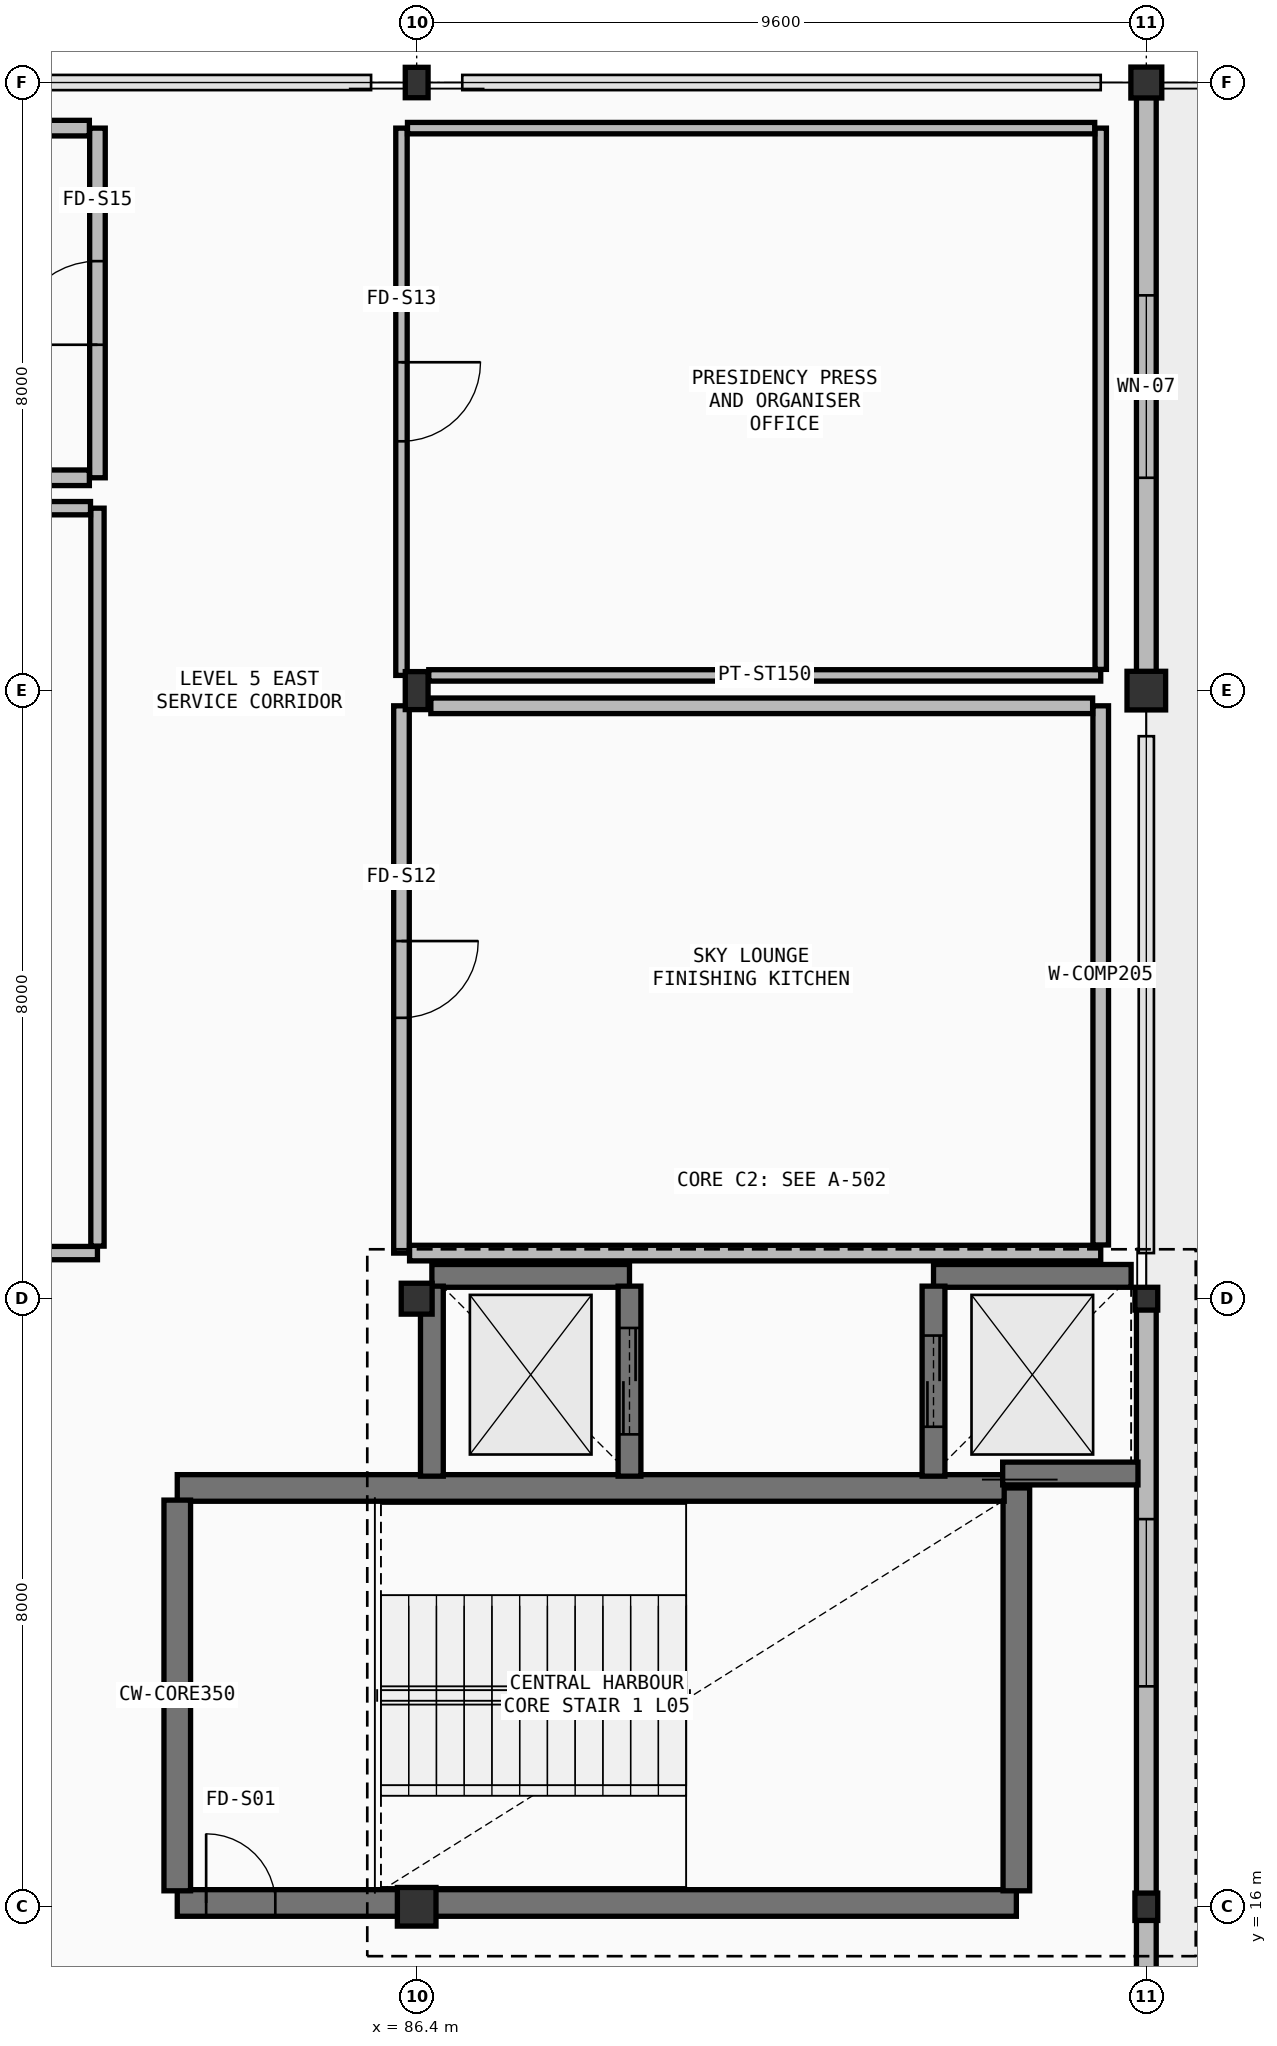
"""IFC4 building model, lengths in metres.
Left out: names, types, materials, properties, quantities, classifications, styles, units other than length and angle.
Written with IfcOpenShell. Run it as: python <this file> out.ifc"""

import sys

from ifc_helpers import new_model, si_unit, direction, frame, frame_2d, origin, origin_2d, place, context, subcontext, project, spatial, rectangle, hollow_circle, i_section, extrude, element, fill, save


model = new_model("IFC4")
c1 = context("Model", 3, precision=1e-05, world=origin(), true_north=direction((0.0, 1.0)))
c2 = subcontext(c1, "Body", "Model", "MODEL_VIEW")
j1 = project(units=[si_unit("LENGTHUNIT", "METRE"), si_unit("PLANEANGLEUNIT", "RADIAN")], contexts=[c1])
p1 = place(None, origin())
s1 = spatial("IfcSite", under=j1, at=p1, CompositionType="ELEMENT")
p2 = place(p1, origin())
s2 = spatial("IfcBuilding", under=s1, at=p2, CompositionType="ELEMENT")
p3 = place(p2, frame((0.0, 0.0, 24.9)))
s3 = spatial("IfcBuildingStorey", under=s2, at=p3, CompositionType="ELEMENT", Elevation=24.9)
p4 = place(p3, frame((86.4, 16.0, 0.0), z_axis=(0.0, 0.0, 1.0), x_axis=(1.0, 0.0, 0.0)))
e1 = element("IfcColumn", 1, at=p4, inside=s3, PredefinedType="COLUMN", context=c2, shape_type="SweptSolid", body=[
    extrude(hollow_circle(Radius=0.254, WallThickness=0.025, at=origin_2d()), origin(), (0.0, 0.0, 1.0), 4.5),
])
p5 = place(p3, frame((86.4, 24.0, 0.0), z_axis=(0.0, 0.0, 1.0), x_axis=(1.0, 0.0, 0.0)))
e2 = element("IfcColumn", 2, at=p5, inside=s3, PredefinedType="COLUMN", context=c2, shape_type="SweptSolid", body=[
    extrude(hollow_circle(Radius=0.203, WallThickness=0.02, at=origin_2d()), origin(), (0.0, 0.0, 1.0), 4.5),
])
p6 = place(p3, frame((86.4, 32.0, 0.0), z_axis=(0.0, 0.0, 1.0), x_axis=(1.0, 0.0, 0.0)))
e3 = element("IfcColumn", 3, at=p6, inside=s3, PredefinedType="COLUMN", context=c2, shape_type="SweptSolid", body=[
    extrude(i_section(OverallWidth=0.3, OverallDepth=0.5, WebThickness=0.014, FlangeThickness=0.028, FilletRadius=0.027, at=origin_2d()), origin(), (0.0, 0.0, 1.0), 4.5),
])
p7 = place(p3, frame((86.4, 40.0, 0.0), z_axis=(0.0, 0.0, 1.0), x_axis=(1.0, 0.0, 0.0)))
e4 = element("IfcColumn", 4, at=p7, inside=s3, PredefinedType="COLUMN", context=c2, shape_type="SweptSolid", body=[
    extrude(i_section(OverallWidth=0.3, OverallDepth=0.4, WebThickness=0.013, FlangeThickness=0.024, FilletRadius=0.027, at=origin_2d()), origin(), (0.0, 0.0, 1.0), 4.5),
])
p8 = place(p3, frame((96.0, 16.0, 0.0), z_axis=(0.0, 0.0, 1.0), x_axis=(1.0, 0.0, 0.0)))
e5 = element("IfcColumn", 5, at=p8, inside=s3, PredefinedType="COLUMN", context=c2, shape_type="SweptSolid", body=[
    extrude(i_section(OverallWidth=0.3, OverallDepth=0.36, WebThickness=0.012, FlangeThickness=0.022, FilletRadius=0.027, at=origin_2d()), origin(), (0.0, 0.0, 1.0), 4.5),
])
p9 = place(p3, frame((96.0, 24.0, 0.0), z_axis=(0.0, 0.0, 1.0), x_axis=(1.0, 0.0, 0.0)))
e6 = element("IfcColumn", 6, at=p9, inside=s3, PredefinedType="COLUMN", context=c2, shape_type="SweptSolid", body=[
    extrude(i_section(OverallWidth=0.3, OverallDepth=0.3, WebThickness=0.011, FlangeThickness=0.019, FilletRadius=0.027, at=origin_2d()), origin(), (0.0, 0.0, 1.0), 4.5),
])
p10 = place(p3, frame((96.0, 32.0, 0.0), z_axis=(0.0, 0.0, 1.0), x_axis=(1.0, 0.0, 0.0)))
e7 = element("IfcColumn", 7, at=p10, inside=s3, PredefinedType="COLUMN", context=c2, shape_type="SweptSolid", body=[
    extrude(hollow_circle(Radius=0.254, WallThickness=0.025, at=origin_2d()), origin(), (0.0, 0.0, 1.0), 4.5),
])
p11 = place(p3, frame((96.0, 40.0, 0.0), z_axis=(0.0, 0.0, 1.0), x_axis=(1.0, 0.0, 0.0)))
e8 = element("IfcColumn", 8, at=p11, inside=s3, PredefinedType="COLUMN", context=c2, shape_type="SweptSolid", body=[
    extrude(hollow_circle(Radius=0.203, WallThickness=0.02, at=origin_2d()), origin(), (0.0, 0.0, 1.0), 4.5),
])
p12 = place(p3, frame((96.0, 10.8, 0.0), z_axis=(0.0, 0.0, 1.0), x_axis=(0.0, 1.0, 0.0)))
e9 = element("IfcWall", 9, at=p12, inside=s3, PredefinedType="STANDARD", context=c2, shape_type="SweptSolid", body=[
    extrude(rectangle(XDim=5.2, YDim=0.26, at=frame_2d((2.6, 0.0))), origin(), (0.0, 0.0, 1.0), 4.26),
])
p13 = place(p12, frame((1.6, 0.0, 0.9)))
e10 = element("IfcOpeningElement", 10, at=p13, cuts=e9, PredefinedType="OPENING", context=c2, shape_type="SweptSolid", body=[
    extrude(rectangle(XDim=2.0, YDim=2.1, at=frame_2d((1.0, 1.05))), frame((0.0, 0.14, 0.0), z_axis=(0.0, -1.0, 0.0), x_axis=(1.0, 0.0, 0.0)), (0.0, 0.0, 1.0), 0.28),
])
p14 = place(p3, frame((96.0, 16.0, 0.0), z_axis=(0.0, 0.0, 1.0), x_axis=(0.0, 1.0, 0.0)))
e11 = element("IfcWall", 11, at=p14, inside=s3, PredefinedType="STANDARD", context=c2, shape_type="SweptSolid", body=[
    extrude(rectangle(XDim=8.0, YDim=0.26, at=frame_2d((4.0, 0.0))), origin(), (0.0, 0.0, 1.0), 3.84),
])
p15 = place(p14, frame((2.9, 0.0, 0.9)))
e12 = element("IfcOpeningElement", 12, at=p15, cuts=e11, PredefinedType="OPENING", context=c2, shape_type="SweptSolid", body=[
    extrude(rectangle(XDim=2.2, YDim=2.15, at=frame_2d((1.1, 1.075))), frame((0.0, 0.14, 0.0), z_axis=(0.0, -1.0, 0.0), x_axis=(1.0, 0.0, 0.0)), (0.0, 0.0, 1.0), 0.28),
])
p16 = place(p3, frame((96.0, 32.0, 0.0), z_axis=(0.0, 0.0, 1.0), x_axis=(0.0, 1.0, 0.0)))
e13 = element("IfcWall", 13, at=p16, inside=s3, PredefinedType="STANDARD", context=c2, shape_type="SweptSolid", body=[
    extrude(rectangle(XDim=8.0, YDim=0.26, at=frame_2d((4.0, 0.0))), origin(), (0.0, 0.0, 1.0), 3.83),
])
p17 = place(p16, frame((2.8, 0.0, 0.9)))
e14 = element("IfcOpeningElement", 14, at=p17, cuts=e13, PredefinedType="OPENING", context=c2, shape_type="SweptSolid", body=[
    extrude(rectangle(XDim=2.4, YDim=2.2, at=frame_2d((1.2, 1.1))), frame((0.0, 0.14, 0.0), z_axis=(0.0, -1.0, 0.0), x_axis=(1.0, 0.0, 0.0)), (0.0, 0.0, 1.0), 0.28),
])
p18 = place(p3, frame((83.25, 16.05, 0.0), z_axis=(0.0, 0.0, 1.0), x_axis=(1.0, 0.0, 0.0)))
e15 = element("IfcWall", 15, at=p18, inside=s3, PredefinedType="SHEAR", context=c2, shape_type="SweptSolid", body=[
    extrude(rectangle(XDim=11.04, YDim=0.35, at=frame_2d((5.52, 0.0))), origin(), (0.0, 0.0, 1.0), 4.27),
])
p19 = place(p18, frame((0.38, 0.0, 0.0)))
e16 = element("IfcOpeningElement", 16, at=p19, cuts=e15, PredefinedType="OPENING", context=c2, shape_type="SweptSolid", body=[
    extrude(rectangle(XDim=0.91, YDim=2.08, at=frame_2d((0.455, 1.04))), frame((0.0, 0.185, 0.0), z_axis=(0.0, -1.0, 0.0), x_axis=(1.0, 0.0, 0.0)), (0.0, 0.0, 1.0), 0.37),
])
p20 = place(p3, frame((94.29, 16.21, 0.0), z_axis=(0.0, 0.0, 1.0), x_axis=(0.0, 1.0, 0.0)))
e17 = element("IfcWall", 17, at=p20, inside=s3, PredefinedType="SHEAR", context=c2, shape_type="SweptSolid", body=[
    extrude(rectangle(XDim=5.3, YDim=0.35, at=frame_2d((2.65, 0.0))), origin(), (0.0, 0.0, 1.0), 4.27),
])
p21 = place(p3, frame((94.13, 21.51, 0.0), z_axis=(0.0, 0.0, 1.0), x_axis=(-1.0, 0.0, 0.0)))
e18 = element("IfcWall", 18, at=p21, inside=s3, PredefinedType="SHEAR", context=c2, shape_type="SweptSolid", body=[
    extrude(rectangle(XDim=10.88, YDim=0.35, at=frame_2d((5.44, 0.0))), origin(), (0.0, 0.0, 1.0), 4.27),
])
p22 = place(p3, frame((83.25, 21.35, 0.0), z_axis=(0.0, 0.0, 1.0), x_axis=(0.0, -1.0, 0.0)))
e19 = element("IfcWall", 19, at=p22, inside=s3, PredefinedType="SHEAR", context=c2, shape_type="SweptSolid", body=[
    extrude(rectangle(XDim=5.14, YDim=0.35, at=frame_2d((2.57, 0.0))), origin(), (0.0, 0.0, 1.0), 4.27),
])
p23 = place(p3, frame((89.2, 24.3, 0.0), z_axis=(0.0, 0.0, 1.0), x_axis=(-1.0, 0.0, 0.0)))
e20 = element("IfcWall", 20, at=p23, inside=s3, PredefinedType="SHEAR", context=c2, shape_type="SweptSolid", body=[
    extrude(rectangle(XDim=2.6, YDim=0.3, at=frame_2d((1.3, 0.0))), origin(), (0.0, 0.0, 1.0), 4.27),
])
p24 = place(p3, frame((89.2, 21.665, 0.0), z_axis=(0.0, 0.0, 1.0), x_axis=(0.0, 1.0, 0.0)))
e21 = element("IfcWall", 21, at=p24, inside=s3, PredefinedType="SHEAR", context=c2, shape_type="SweptSolid", body=[
    extrude(rectangle(XDim=2.5, YDim=0.3, at=frame_2d((1.25, 0.0))), origin(), (0.0, 0.0, 1.0), 4.27),
])
p25 = place(p24, frame((0.55, 0.0, 0.0)))
e22 = element("IfcOpeningElement", 22, at=p25, cuts=e21, PredefinedType="OPENING", context=c2, shape_type="SweptSolid", body=[
    extrude(rectangle(XDim=1.4, YDim=2.26, at=frame_2d((0.7, 1.13))), frame((0.0, 0.16, 0.0), z_axis=(0.0, -1.0, 0.0), x_axis=(1.0, 0.0, 0.0)), (0.0, 0.0, 1.0), 0.32),
])
p26 = place(p3, frame((86.6, 24.165, 0.0), z_axis=(0.0, 0.0, 1.0), x_axis=(0.0, -1.0, 0.0)))
e23 = element("IfcWall", 23, at=p26, inside=s3, PredefinedType="SHEAR", context=c2, shape_type="SweptSolid", body=[
    extrude(rectangle(XDim=2.5, YDim=0.3, at=frame_2d((1.25, 0.0))), origin(), (0.0, 0.0, 1.0), 4.27),
])
p27 = place(p3, frame((95.8, 24.3, 0.0), z_axis=(0.0, 0.0, 1.0), x_axis=(-1.0, 0.0, 0.0)))
e24 = element("IfcWall", 24, at=p27, inside=s3, PredefinedType="SHEAR", context=c2, shape_type="SweptSolid", body=[
    extrude(rectangle(XDim=2.6, YDim=0.3, at=frame_2d((1.3, 0.0))), origin(), (0.0, 0.0, 1.0), 4.26),
])
p28 = place(p3, frame((94.11, 21.7, 0.0), z_axis=(0.0, 0.0, 1.0), x_axis=(1.0, 0.0, 0.0)))
e25 = element("IfcWall", 25, at=p28, inside=s3, PredefinedType="SHEAR", context=c2, shape_type="SweptSolid", body=[
    extrude(rectangle(XDim=1.78, YDim=0.3, at=frame_2d((0.89, 0.0))), origin(), (0.0, 0.0, 1.0), 4.27),
])
p29 = place(p3, frame((93.2, 24.165, 0.0), z_axis=(0.0, 0.0, 1.0), x_axis=(0.0, -1.0, 0.0)))
e26 = element("IfcWall", 26, at=p29, inside=s3, PredefinedType="SHEAR", context=c2, shape_type="SweptSolid", body=[
    extrude(rectangle(XDim=2.5, YDim=0.3, at=frame_2d((1.25, 0.0))), origin(), (0.0, 0.0, 1.0), 4.26),
])
p30 = place(p29, frame((0.65, 0.0, 0.0)))
e27 = element("IfcOpeningElement", 27, at=p30, cuts=e26, PredefinedType="OPENING", context=c2, shape_type="SweptSolid", body=[
    extrude(rectangle(XDim=1.2, YDim=2.2, at=frame_2d((0.6, 1.1))), frame((0.0, 0.16, 0.0), z_axis=(0.0, -1.0, 0.0), x_axis=(1.0, 0.0, 0.0)), (0.0, 0.0, 1.0), 0.32),
])
p31 = place(p3, frame((67.6, 24.6, 0.0), z_axis=(0.0, 0.0, 1.0), x_axis=(1.0, 0.0, 0.0)))
e28 = element("IfcWall", 28, at=p31, inside=s3, PredefinedType="PARTITIONING", context=c2, shape_type="SweptSolid", body=[
    extrude(rectangle(XDim=14.6, YDim=0.175, at=frame_2d((7.3, 0.0))), origin(), (0.0, 0.0, 1.0), 3.34),
])
p32 = place(p31, frame((10.896, 0.0, 0.0)))
e29 = element("IfcOpeningElement", 29, at=p32, cuts=e28, PredefinedType="OPENING", context=c2, shape_type="SweptSolid", body=[
    extrude(rectangle(XDim=0.98, YDim=2.2, at=frame_2d((0.49, 1.1))), frame((0.0, 0.097, 0.0), z_axis=(0.0, -1.0, 0.0), x_axis=(1.0, 0.0, 0.0)), (0.0, 0.0, 1.0), 0.195),
])
p33 = place(p3, frame((82.2, 24.691, 0.0), z_axis=(0.0, 0.0, 1.0), x_axis=(0.0, 1.0, 0.0)))
e30 = element("IfcWall", 30, at=p33, inside=s3, PredefinedType="PARTITIONING", context=c2, shape_type="SweptSolid", body=[
    extrude(rectangle(XDim=9.708, YDim=0.175, at=frame_2d((4.854, 0.0))), origin(), (0.0, 0.0, 1.0), 3.74),
])
p34 = place(p3, frame((82.108, 34.4, 0.0), z_axis=(0.0, 0.0, 1.0), x_axis=(-1.0, 0.0, 0.0)))
e31 = element("IfcWall", 31, at=p34, inside=s3, PredefinedType="PARTITIONING", context=c2, shape_type="SweptSolid", body=[
    extrude(rectangle(XDim=14.508, YDim=0.175, at=frame_2d((7.254, 0.0))), origin(), (0.0, 0.0, 1.0), 3.53),
])
p35 = place(p3, frame((86.2, 31.8, 0.0), z_axis=(0.0, 0.0, 1.0), x_axis=(0.0, -1.0, 0.0)))
e32 = element("IfcWall", 32, at=p35, inside=s3, PredefinedType="SOLIDWALL", context=c2, shape_type="SweptSolid", body=[
    extrude(rectangle(XDim=7.2, YDim=0.205, at=frame_2d((3.6, 0.0))), origin(), (0.0, 0.0, 1.0), 3.54),
])
p36 = place(p35, frame((3.095, 0.0, 0.0)))
e33 = element("IfcOpeningElement", 33, at=p36, cuts=e32, PredefinedType="OPENING", context=c2, shape_type="SweptSolid", body=[
    extrude(rectangle(XDim=1.01, YDim=2.22, at=frame_2d((0.505, 1.11))), frame((0.0, 0.113, 0.0), z_axis=(0.0, -1.0, 0.0), x_axis=(1.0, 0.0, 0.0)), (0.0, 0.0, 1.0), 0.225),
])
p37 = place(p3, frame((86.306, 24.6, 0.0), z_axis=(0.0, 0.0, 1.0), x_axis=(1.0, 0.0, 0.0)))
e34 = element("IfcWall", 34, at=p37, inside=s3, PredefinedType="SOLIDWALL", context=c2, shape_type="SweptSolid", body=[
    extrude(rectangle(XDim=9.094, YDim=0.205, at=frame_2d((4.547, 0.0))), origin(), (0.0, 0.0, 1.0), 3.54),
])
p38 = place(p3, frame((95.4, 24.707, 0.0), z_axis=(0.0, 0.0, 1.0), x_axis=(0.0, 1.0, 0.0)))
e35 = element("IfcWall", 35, at=p38, inside=s3, PredefinedType="SOLIDWALL", context=c2, shape_type="SweptSolid", body=[
    extrude(rectangle(XDim=7.094, YDim=0.205, at=frame_2d((3.547, 0.0))), origin(), (0.0, 0.0, 1.0), 4.26),
])
p39 = place(p3, frame((95.293, 31.8, 0.0), z_axis=(0.0, 0.0, 1.0), x_axis=(-1.0, 0.0, 0.0)))
e36 = element("IfcWall", 36, at=p39, inside=s3, PredefinedType="SOLIDWALL", context=c2, shape_type="SweptSolid", body=[
    extrude(rectangle(XDim=8.707, YDim=0.205, at=frame_2d((4.354, 0.0))), origin(), (0.0, 0.0, 1.0), 3.84),
])
p40 = place(p3, frame((86.2, 39.4, 0.0), z_axis=(0.0, 0.0, 1.0), x_axis=(0.0, -1.0, 0.0)))
e37 = element("IfcWall", 37, at=p40, inside=s3, PredefinedType="PARTITIONING", context=c2, shape_type="SweptSolid", body=[
    extrude(rectangle(XDim=7.2, YDim=0.15, at=frame_2d((3.6, 0.0))), origin(), (0.0, 0.0, 1.0), 3.63),
])
p41 = place(p40, frame((3.08, 0.0, 0.0)))
e38 = element("IfcOpeningElement", 38, at=p41, cuts=e37, PredefinedType="OPENING", context=c2, shape_type="SweptSolid", body=[
    extrude(rectangle(XDim=1.04, YDim=2.24, at=frame_2d((0.52, 1.12))), frame((0.0, 0.085, 0.0), z_axis=(0.0, -1.0, 0.0), x_axis=(1.0, 0.0, 0.0)), (0.0, 0.0, 1.0), 0.17),
])
p42 = place(p3, frame((86.559, 32.2, 0.0), z_axis=(0.0, 0.0, 1.0), x_axis=(1.0, 0.0, 0.0)))
e39 = element("IfcWall", 39, at=p42, inside=s3, PredefinedType="PARTITIONING", context=c2, shape_type="SweptSolid", body=[
    extrude(rectangle(XDim=8.841, YDim=0.15, at=frame_2d((4.42, 0.0))), origin(), (0.0, 0.0, 1.0), 3.84),
])
p43 = place(p3, frame((95.4, 32.279, 0.0), z_axis=(0.0, 0.0, 1.0), x_axis=(0.0, 1.0, 0.0)))
e40 = element("IfcWall", 40, at=p43, inside=s3, PredefinedType="PARTITIONING", context=c2, shape_type="SweptSolid", body=[
    extrude(rectangle(XDim=7.121, YDim=0.15, at=frame_2d((3.561, 0.0))), origin(), (0.0, 0.0, 1.0), 4.26),
])
p44 = place(p3, frame((95.321, 39.4, 0.0), z_axis=(0.0, 0.0, 1.0), x_axis=(-1.0, 0.0, 0.0)))
e41 = element("IfcWall", 41, at=p44, inside=s3, PredefinedType="PARTITIONING", context=c2, shape_type="SweptSolid", body=[
    extrude(rectangle(XDim=9.042, YDim=0.15, at=frame_2d((4.521, 0.0))), origin(), (0.0, 0.0, 1.0), 3.63),
])
p45 = place(p3, frame((82.2, 34.8, 0.0), z_axis=(0.0, 0.0, 1.0), x_axis=(0.0, 1.0, 0.0)))
e42 = element("IfcWall", 42, at=p45, inside=s3, PredefinedType="SOLIDWALL", context=c2, shape_type="SweptSolid", body=[
    extrude(rectangle(XDim=4.6, YDim=0.205, at=frame_2d((2.3, 0.0))), origin(), (0.0, 0.0, 1.0), 4.26),
])
p46 = place(p45, frame((1.75, 0.0, 0.0)))
e43 = element("IfcOpeningElement", 43, at=p46, cuts=e42, PredefinedType="OPENING", context=c2, shape_type="SweptSolid", body=[
    extrude(rectangle(XDim=1.1, YDim=2.28, at=frame_2d((0.55, 1.14))), frame((0.0, 0.113, 0.0), z_axis=(0.0, -1.0, 0.0), x_axis=(1.0, 0.0, 0.0)), (0.0, 0.0, 1.0), 0.225),
])
for number, where, z_axis, x_axis in (
    (44, (75.0, 34.8, 0.0), (0.0, 0.0, 1.0), (1.0, 0.0, 0.0)),
    (45, (82.094, 39.4, 0.0), (0.0, 0.0, 1.0), (-1.0, 0.0, 0.0)),
):
    element("IfcWall", number, at=place(p3, frame(where, z_axis=z_axis, x_axis=x_axis)), inside=s3, PredefinedType="SOLIDWALL", context=c2, shape_type="SweptSolid", body=[
        extrude(rectangle(XDim=7.094, YDim=0.205, at=frame_2d((3.547, 0.0))), origin(), (0.0, 0.0, 1.0), 3.53),
    ])
p47 = place(p15, origin())
e46 = element("IfcWindow", 46, at=p47, inside=s3, PartitioningType="SINGLE_PANEL", PredefinedType="WINDOW", context=c2, shape_type="SweptSolid", body=[
    extrude(rectangle(XDim=2.2, YDim=2.15, at=frame_2d((1.1, 1.075))), frame((0.0, 0.03, 0.0), z_axis=(0.0, -1.0, 0.0), x_axis=(1.0, 0.0, 0.0)), (0.0, 0.0, 1.0), 0.06),
])
fill(e12, e46)
p48 = place(p17, origin())
e47 = element("IfcWindow", 47, at=p48, inside=s3, PartitioningType="SINGLE_PANEL", PredefinedType="WINDOW", context=c2, shape_type="SweptSolid", body=[
    extrude(rectangle(XDim=2.4, YDim=2.2, at=frame_2d((1.2, 1.1))), frame((0.0, 0.03, 0.0), z_axis=(0.0, -1.0, 0.0), x_axis=(1.0, 0.0, 0.0)), (0.0, 0.0, 1.0), 0.06),
])
fill(e14, e47)
p49 = place(p19, origin())
e48 = element("IfcDoor", 48, at=p49, inside=s3, OperationType="SINGLE_SWING_LEFT", PredefinedType="DOOR", context=c2, shape_type="SweptSolid", body=[
    extrude(rectangle(XDim=0.91, YDim=2.08, at=frame_2d((0.455, 1.04))), frame((0.0, 0.025, 0.0), z_axis=(0.0, -1.0, 0.0), x_axis=(1.0, 0.0, 0.0)), (0.0, 0.0, 1.0), 0.05),
])
fill(e16, e48)
p50 = place(p25, origin())
e49 = element("IfcDoor", 49, at=p50, inside=s3, OperationType="DOUBLE_DOOR_SLIDING", PredefinedType="DOOR", context=c2, shape_type="SweptSolid", body=[
    extrude(rectangle(XDim=1.4, YDim=2.26, at=frame_2d((0.7, 1.13))), frame((0.0, 0.025, 0.0), z_axis=(0.0, -1.0, 0.0), x_axis=(1.0, 0.0, 0.0)), (0.0, 0.0, 1.0), 0.05),
])
fill(e22, e49)
p51 = place(p30, origin())
e50 = element("IfcDoor", 50, at=p51, inside=s3, OperationType="DOUBLE_DOOR_SLIDING", PredefinedType="DOOR", context=c2, shape_type="SweptSolid", body=[
    extrude(rectangle(XDim=1.2, YDim=2.2, at=frame_2d((0.6, 1.1))), frame((0.0, 0.025, 0.0), z_axis=(0.0, -1.0, 0.0), x_axis=(1.0, 0.0, 0.0)), (0.0, 0.0, 1.0), 0.05),
])
fill(e27, e50)
p52 = place(p36, origin())
e51 = element("IfcDoor", 51, at=p52, inside=s3, OperationType="SINGLE_SWING_LEFT", PredefinedType="DOOR", context=c2, shape_type="SweptSolid", body=[
    extrude(rectangle(XDim=1.01, YDim=2.22, at=frame_2d((0.505, 1.11))), frame((0.0, 0.025, 0.0), z_axis=(0.0, -1.0, 0.0), x_axis=(1.0, 0.0, 0.0)), (0.0, 0.0, 1.0), 0.05),
])
fill(e33, e51)
p53 = place(p41, origin())
e52 = element("IfcDoor", 52, at=p53, inside=s3, OperationType="SINGLE_SWING_RIGHT", PredefinedType="DOOR", context=c2, shape_type="SweptSolid", body=[
    extrude(rectangle(XDim=1.04, YDim=2.24, at=frame_2d((0.52, 1.12))), frame((0.0, 0.025, 0.0), z_axis=(0.0, -1.0, 0.0), x_axis=(1.0, 0.0, 0.0)), (0.0, 0.0, 1.0), 0.05),
])
fill(e38, e52)
p54 = place(p46, origin())
e53 = element("IfcDoor", 53, at=p54, inside=s3, OperationType="SINGLE_SWING_RIGHT", PredefinedType="DOOR", context=c2, shape_type="SweptSolid", body=[
    extrude(rectangle(XDim=1.1, YDim=2.28, at=frame_2d((0.55, 1.14))), frame((0.0, 0.025, 0.0), z_axis=(0.0, -1.0, 0.0), x_axis=(1.0, 0.0, 0.0)), (0.0, 0.0, 1.0), 0.05),
])
fill(e43, e53)
save(model, sys.argv[1])
